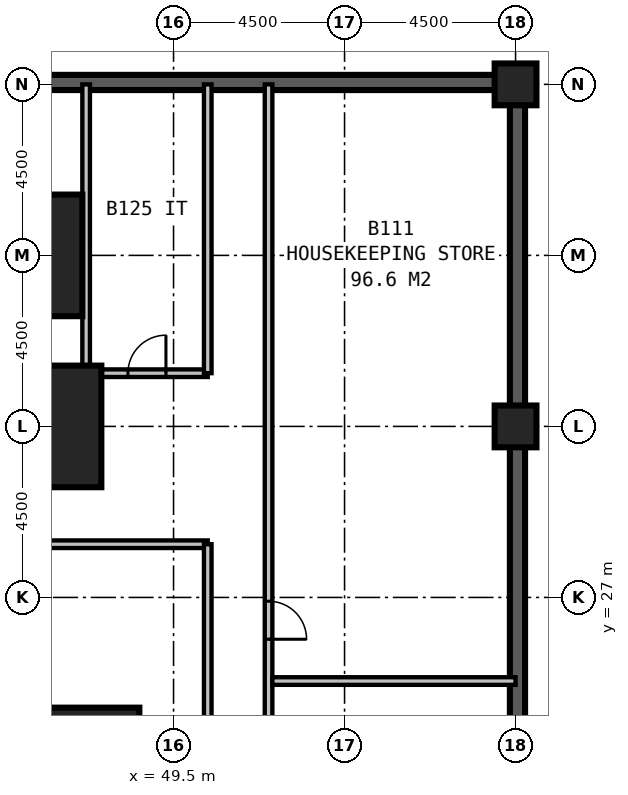
"""IFC4 building model, lengths in metres.
Left out: names, types, materials, properties, quantities, classifications, styles, units other than length and angle.
Written with IfcOpenShell. Run it as: python <this file> out.ifc"""

import sys

from ifc_helpers import new_model, si_unit, direction, frame, frame_2d, origin, origin_2d, place, context, subcontext, project, spatial, rectangle, extrude, element, fill, save


model = new_model("IFC4")
c1 = context("Model", 3, precision=1e-05, world=origin(), true_north=direction((0.0, 1.0)))
c2 = subcontext(c1, "Body", "Model", "MODEL_VIEW")
j1 = project(units=[si_unit("LENGTHUNIT", "METRE"), si_unit("PLANEANGLEUNIT", "RADIAN")], contexts=[c1])
p1 = place(None, origin())
s1 = spatial("IfcSite", under=j1, at=p1, CompositionType="ELEMENT")
p2 = place(p1, origin())
s2 = spatial("IfcBuilding", under=s1, at=p2, CompositionType="ELEMENT")
p3 = place(p2, frame((0.0, 0.0, -4.5)))
s3 = spatial("IfcBuildingStorey", under=s2, at=p3, CompositionType="ELEMENT", Elevation=-4.5)
for number, where, z_axis, x_axis in (
    (1, (47.0, 22.5, 0.0), (0.0, 0.0, 1.0), (1.0, 0.0, 0.0)),
    (2, (46.0, 31.5, 0.0), (0.0, 0.0, 1.0), (1.0, 0.0, 0.0)),
    (3, (45.5, 36.0, 0.0), (0.0, 0.0, 1.0), (1.0, 0.0, 0.0)),
):
    element("IfcColumn", number, at=place(p3, frame(where, z_axis=z_axis, x_axis=x_axis)), inside=s3, PredefinedType="COLUMN", context=c2, shape_type="SweptSolid", body=[
        extrude(rectangle(XDim=3.2, YDim=3.2, at=origin_2d()), origin(), (0.0, 0.0, 1.0), 4.5),
    ])
for number, where, z_axis, x_axis in (
    (4, (58.5, 31.5, 0.0), (0.0, 0.0, 1.0), (1.0, 0.0, 0.0)),
    (5, (58.5, 40.5, 0.0), (0.0, 0.0, 1.0), (1.0, 0.0, 0.0)),
):
    element("IfcColumn", number, at=place(p3, frame(where, z_axis=z_axis, x_axis=x_axis)), inside=s3, PredefinedType="COLUMN", context=c2, shape_type="SweptSolid", body=[
        extrude(rectangle(XDim=1.1, YDim=1.1, at=origin_2d()), origin(), (0.0, 0.0, 1.0), 4.5),
    ])
p4 = place(p3, frame((58.55, -13.35, 0.0), z_axis=(0.0, 0.0, 1.0), x_axis=(0.0, 1.0, 0.0)))
e6 = element("IfcWall", 6, at=p4, inside=s3, PredefinedType="SOLIDWALL", context=c2, shape_type="SweptSolid", body=[
    extrude(rectangle(XDim=53.7, YDim=0.4, at=frame_2d((26.85, 0.0))), origin(), (0.0, 0.0, 1.0), 4.5),
])
p5 = place(p3, frame((58.75, 40.55, 0.0), z_axis=(0.0, 0.0, 1.0), x_axis=(-1.0, 0.0, 0.0)))
e7 = element("IfcWall", 7, at=p5, inside=s3, PredefinedType="SOLIDWALL", context=c2, shape_type="SweptSolid", body=[
    extrude(rectangle(XDim=77.0, YDim=0.4, at=frame_2d((38.5, 0.0))), origin(), (0.0, 0.0, 1.0), 4.5),
])
p6 = place(p3, frame((-13.4, 32.9, 0.0), z_axis=(0.0, 0.0, 1.0), x_axis=(1.0, 0.0, 0.0)))
e8 = element("IfcWall", 8, at=p6, inside=s3, PredefinedType="PARTITIONING", context=c2, shape_type="SweptSolid", body=[
    extrude(rectangle(XDim=63.8, YDim=0.2, at=frame_2d((31.9, 0.0))), origin(), (0.0, 0.0, 1.0), 4.2),
])
p7 = place(p6, frame((1.5, 0.0, 0.0)))
e9 = element("IfcOpeningElement", 9, at=p7, cuts=e8, PredefinedType="OPENING", context=c2, shape_type="SweptSolid", body=[
    extrude(rectangle(XDim=1.0, YDim=2.1, at=frame_2d((0.5, 1.05))), frame((0.0, 0.11, 0.0), z_axis=(0.0, -1.0, 0.0), x_axis=(1.0, 0.0, 0.0)), (0.0, 0.0, 1.0), 0.22),
])
p8 = place(p6, frame((25.3, 0.0, 0.0)))
e10 = element("IfcOpeningElement", 10, at=p8, cuts=e8, PredefinedType="OPENING", context=c2, shape_type="SweptSolid", body=[
    extrude(rectangle(XDim=1.0, YDim=2.1, at=frame_2d((0.5, 1.05))), frame((0.0, 0.11, 0.0), z_axis=(0.0, -1.0, 0.0), x_axis=(1.0, 0.0, 0.0)), (0.0, 0.0, 1.0), 0.22),
])
p9 = place(p6, frame((34.3, 0.0, 0.0)))
e11 = element("IfcOpeningElement", 11, at=p9, cuts=e8, PredefinedType="OPENING", context=c2, shape_type="SweptSolid", body=[
    extrude(rectangle(XDim=1.0, YDim=2.1, at=frame_2d((0.5, 1.05))), frame((0.0, 0.11, 0.0), z_axis=(0.0, -1.0, 0.0), x_axis=(1.0, 0.0, 0.0)), (0.0, 0.0, 1.0), 0.22),
])
p10 = place(p6, frame((43.3, 0.0, 0.0)))
e12 = element("IfcOpeningElement", 12, at=p10, cuts=e8, PredefinedType="OPENING", context=c2, shape_type="SweptSolid", body=[
    extrude(rectangle(XDim=1.0, YDim=2.1, at=frame_2d((0.5, 1.05))), frame((0.0, 0.11, 0.0), z_axis=(0.0, -1.0, 0.0), x_axis=(1.0, 0.0, 0.0)), (0.0, 0.0, 1.0), 0.22),
])
p11 = place(p6, frame((47.8, 0.0, 0.0)))
e13 = element("IfcOpeningElement", 13, at=p11, cuts=e8, PredefinedType="OPENING", context=c2, shape_type="SweptSolid", body=[
    extrude(rectangle(XDim=1.0, YDim=2.1, at=frame_2d((0.5, 1.05))), frame((0.0, 0.11, 0.0), z_axis=(0.0, -1.0, 0.0), x_axis=(1.0, 0.0, 0.0)), (0.0, 0.0, 1.0), 0.22),
])
p12 = place(p6, frame((61.7, 0.0, 0.0)))
e14 = element("IfcOpeningElement", 14, at=p12, cuts=e8, PredefinedType="OPENING", context=c2, shape_type="SweptSolid", body=[
    extrude(rectangle(XDim=1.0, YDim=2.1, at=frame_2d((0.5, 1.05))), frame((0.0, 0.11, 0.0), z_axis=(0.0, -1.0, 0.0), x_axis=(1.0, 0.0, 0.0)), (0.0, 0.0, 1.0), 0.22),
])
p13 = place(p3, frame((47.2, 33.0, 0.0), z_axis=(0.0, 0.0, 1.0), x_axis=(0.0, 1.0, 0.0)))
e15 = element("IfcWall", 15, at=p13, inside=s3, PredefinedType="PARTITIONING", context=c2, shape_type="SweptSolid", body=[
    extrude(rectangle(XDim=7.5, YDim=0.2, at=frame_2d((3.75, 0.0))), origin(), (0.0, 0.0, 1.0), 4.2),
])
p14 = place(p3, frame((52.0, 9.35, 0.0), z_axis=(0.0, 0.0, 1.0), x_axis=(0.0, 1.0, 0.0)))
e16 = element("IfcWall", 16, at=p14, inside=s3, PredefinedType="PARTITIONING", context=c2, shape_type="SweptSolid", body=[
    extrude(rectangle(XDim=31.15, YDim=0.2, at=frame_2d((15.575, 0.0))), origin(), (0.0, 0.0, 1.0), 4.2),
])
p15 = place(p14, frame((2.0, 0.0, 0.0), z_axis=(0.0, 0.0, 1.0), x_axis=(-1.0, 0.0, 0.0)))
e17 = element("IfcOpeningElement", 17, at=p15, cuts=e16, PredefinedType="OPENING", context=c2, shape_type="SweptSolid", body=[
    extrude(rectangle(XDim=1.0, YDim=2.1, at=frame_2d((0.5, 1.05))), frame((0.0, 0.11, 0.0), z_axis=(0.0, -1.0, 0.0), x_axis=(1.0, 0.0, 0.0)), (0.0, 0.0, 1.0), 0.22),
])
p16 = place(p14, frame((10.75, 0.0, 0.0), z_axis=(0.0, 0.0, 1.0), x_axis=(-1.0, 0.0, 0.0)))
e18 = element("IfcOpeningElement", 18, at=p16, cuts=e16, PredefinedType="OPENING", context=c2, shape_type="SweptSolid", body=[
    extrude(rectangle(XDim=1.0, YDim=2.1, at=frame_2d((0.5, 1.05))), frame((0.0, 0.11, 0.0), z_axis=(0.0, -1.0, 0.0), x_axis=(1.0, 0.0, 0.0)), (0.0, 0.0, 1.0), 0.22),
])
p17 = place(p14, frame((17.55, 0.0, 0.0), z_axis=(0.0, 0.0, 1.0), x_axis=(-1.0, 0.0, 0.0)))
e19 = element("IfcOpeningElement", 19, at=p17, cuts=e16, PredefinedType="OPENING", context=c2, shape_type="SweptSolid", body=[
    extrude(rectangle(XDim=1.0, YDim=2.1, at=frame_2d((0.5, 1.05))), frame((0.0, 0.11, 0.0), z_axis=(0.0, -1.0, 0.0), x_axis=(1.0, 0.0, 0.0)), (0.0, 0.0, 1.0), 0.22),
])
p18 = place(p3, frame((52.1, 24.8, 0.0), z_axis=(0.0, 0.0, 1.0), x_axis=(1.0, 0.0, 0.0)))
e20 = element("IfcWall", 20, at=p18, inside=s3, PredefinedType="PARTITIONING", context=c2, shape_type="SweptSolid", body=[
    extrude(rectangle(XDim=6.4, YDim=0.2, at=frame_2d((3.2, 0.0))), origin(), (0.0, 0.0, 1.0), 4.2),
])
p19 = place(p3, frame((50.4, 3.1, 0.0), z_axis=(0.0, 0.0, 1.0), x_axis=(0.0, 1.0, 0.0)))
e21 = element("IfcWall", 21, at=p19, inside=s3, PredefinedType="PARTITIONING", context=c2, shape_type="SweptSolid", body=[
    extrude(rectangle(XDim=25.3, YDim=0.2, at=frame_2d((12.65, 0.0))), origin(), (0.0, 0.0, 1.0), 4.2),
])
p20 = place(p3, frame((39.45, 28.4, 0.0), z_axis=(0.0, 0.0, 1.0), x_axis=(1.0, 0.0, 0.0)))
e22 = element("IfcWall", 22, at=p20, inside=s3, PredefinedType="PARTITIONING", context=c2, shape_type="SweptSolid", body=[
    extrude(rectangle(XDim=10.95, YDim=0.2, at=frame_2d((5.475, 0.0))), origin(), (0.0, 0.0, 1.0), 4.2),
])
p21 = place(p3, frame((50.4, 32.9, 0.0), z_axis=(0.0, 0.0, 1.0), x_axis=(0.0, 1.0, 0.0)))
e23 = element("IfcWall", 23, at=p21, inside=s3, PredefinedType="PARTITIONING", context=c2, shape_type="SweptSolid", body=[
    extrude(rectangle(XDim=7.6, YDim=0.2, at=frame_2d((3.8, 0.0))), origin(), (0.0, 0.0, 1.0), 4.2),
])
p22 = place(p12, origin())
e24 = element("IfcDoor", 24, at=p22, inside=s3, OperationType="SINGLE_SWING_RIGHT", PredefinedType="DOOR", context=c2, shape_type="SweptSolid", body=[
    extrude(rectangle(XDim=1.0, YDim=2.1, at=frame_2d((0.5, 1.05))), frame((0.0, 0.025, 0.0), z_axis=(0.0, -1.0, 0.0), x_axis=(1.0, 0.0, 0.0)), (0.0, 0.0, 1.0), 0.05),
])
fill(e14, e24)
p23 = place(p17, origin())
e25 = element("IfcDoor", 25, at=p23, inside=s3, OperationType="SINGLE_SWING_RIGHT", PredefinedType="DOOR", context=c2, shape_type="SweptSolid", body=[
    extrude(rectangle(XDim=1.0, YDim=2.1, at=frame_2d((0.5, 1.05))), frame((0.0, 0.025, 0.0), z_axis=(0.0, -1.0, 0.0), x_axis=(1.0, 0.0, 0.0)), (0.0, 0.0, 1.0), 0.05),
])
fill(e19, e25)
save(model, sys.argv[1])
